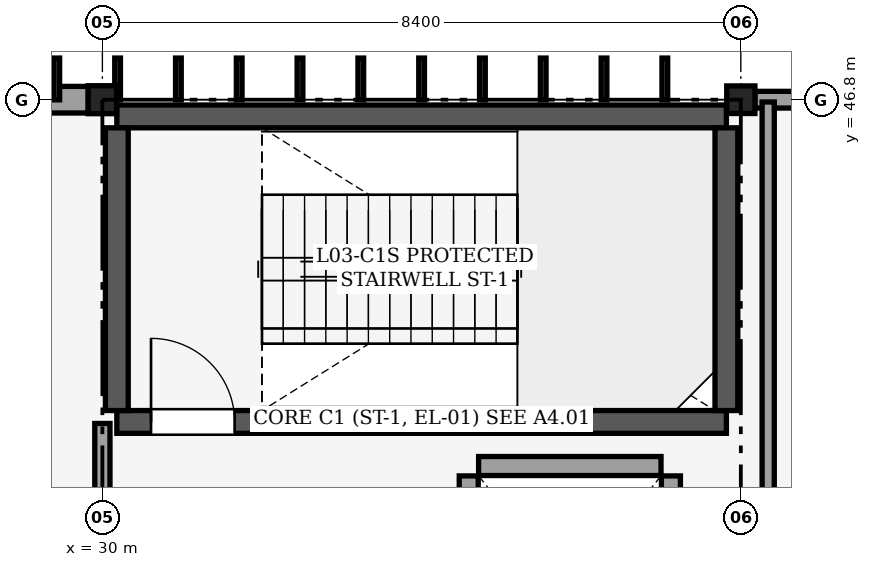
"""IFC4 building model, lengths in metres.
Left out: names, types, materials, properties, quantities, classifications, styles, units other than length and angle.
Written with IfcOpenShell. Run it as: python <this file> out.ifc"""

import sys

from ifc_helpers import new_model, si_unit, direction, frame, frame_2d, origin, origin_2d, place, context, subcontext, project, spatial, rectangle, i_section, extrude, element, fill, save


model = new_model("IFC4")
c1 = context("Model", 3, precision=1e-05, world=origin(), true_north=direction((0.0, 1.0)))
c2 = subcontext(c1, "Body", "Model", "MODEL_VIEW")
j1 = project(units=[si_unit("LENGTHUNIT", "METRE"), si_unit("PLANEANGLEUNIT", "RADIAN")], contexts=[c1])
p1 = place(None, origin())
s1 = spatial("IfcSite", under=j1, at=p1, CompositionType="ELEMENT")
p2 = place(p1, origin())
s2 = spatial("IfcBuilding", under=s1, at=p2, CompositionType="ELEMENT")
p3 = place(p2, frame((0.0, 0.0, 15.0)))
s3 = spatial("IfcBuildingStorey", under=s2, at=p3, CompositionType="ELEMENT", Elevation=15.0)
p4 = place(p3, frame((30.0, 46.8, 0.0), z_axis=(0.0, 0.0, 1.0), x_axis=(1.0, 0.0, 0.0)))
e1 = element("IfcColumn", 1, at=p4, inside=s3, PredefinedType="COLUMN", context=c2, shape_type="SweptSolid", body=[
    extrude(i_section(OverallWidth=0.373, OverallDepth=0.368, WebThickness=0.015, FlangeThickness=0.024, FilletRadius=0.025, at=origin_2d()), origin(), (0.0, 0.0, 1.0), 4.8),
])
p5 = place(p3, frame((38.4, 46.8, 0.0), z_axis=(0.0, 0.0, 1.0), x_axis=(1.0, 0.0, 0.0)))
e2 = element("IfcColumn", 2, at=p5, inside=s3, PredefinedType="COLUMN", context=c2, shape_type="SweptSolid", body=[
    extrude(i_section(OverallWidth=0.371, OverallDepth=0.363, WebThickness=0.013, FlangeThickness=0.022, FilletRadius=0.025, at=origin_2d()), origin(), (0.0, 0.0, 1.0), 4.8),
])
p6 = place(p3, frame((21.787, 46.8, 0.0), z_axis=(0.0, 0.0, 1.0), x_axis=(1.0, 0.0, 0.0)))
e3 = element("IfcWall", 3, at=p6, inside=s3, PredefinedType="SOLIDWALL", context=c2, shape_type="SweptSolid", body=[
    extrude(rectangle(XDim=8.027, YDim=0.35, at=frame_2d((4.013, 0.0))), origin(), (0.0, 0.0, 1.0), 3.908),
])
p7 = place(p6, frame((3.114, 0.0, 0.9)))
e4 = element("IfcOpeningElement", 4, at=p7, cuts=e3, PredefinedType="OPENING", context=c2, shape_type="SweptSolid", body=[
    extrude(rectangle(XDim=1.8, YDim=1.75, at=frame_2d((0.9, 0.875))), frame((0.0, 0.185, 0.0), z_axis=(0.0, -1.0, 0.0), x_axis=(1.0, 0.0, 0.0)), (0.0, 0.0, 1.0), 0.371),
])
p8 = place(p3, frame((38.585, 46.8, 0.0), z_axis=(0.0, 0.0, 1.0), x_axis=(1.0, 0.0, 0.0)))
e5 = element("IfcWall", 5, at=p8, inside=s3, PredefinedType="SOLIDWALL", context=c2, shape_type="SweptSolid", body=[
    extrude(rectangle(XDim=8.031, YDim=0.22, at=frame_2d((4.015, 0.0))), origin(), (0.0, 0.0, 1.0), 3.827),
])
p9 = place(p8, frame((2.965, 0.0, 0.9)))
e6 = element("IfcOpeningElement", 6, at=p9, cuts=e5, PredefinedType="OPENING", context=c2, shape_type="SweptSolid", body=[
    extrude(rectangle(XDim=2.1, YDim=1.75, at=frame_2d((1.05, 0.875))), frame((0.0, 0.12, 0.0), z_axis=(0.0, -1.0, 0.0), x_axis=(1.0, 0.0, 0.0)), (0.0, 0.0, 1.0), 0.24),
])
p10 = place(p3, frame((30.19, 42.56, 0.0), z_axis=(0.0, 0.0, 1.0), x_axis=(1.0, 0.0, 0.0)))
e7 = element("IfcWall", 7, at=p10, inside=s3, PredefinedType="SHEAR", context=c2, shape_type="SweptSolid", body=[
    extrude(rectangle(XDim=8.02, YDim=0.3, at=frame_2d((4.01, 0.0))), origin(), (0.0, 0.0, 1.0), 4.54),
])
p11 = place(p10, frame((0.45, 0.0, 0.0)))
e8 = element("IfcOpeningElement", 8, at=p11, cuts=e7, PredefinedType="OPENING", context=c2, shape_type="SweptSolid", body=[
    extrude(rectangle(XDim=1.1, YDim=2.15, at=frame_2d((0.55, 1.075))), frame((0.0, 0.16, 0.0), z_axis=(0.0, -1.0, 0.0), x_axis=(1.0, 0.0, 0.0)), (0.0, 0.0, 1.0), 0.321),
])
p12 = place(p3, frame((30.19, 46.58, 0.0), z_axis=(0.0, 0.0, 1.0), x_axis=(1.0, 0.0, 0.0)))
e9 = element("IfcWall", 9, at=p12, inside=s3, PredefinedType="SHEAR", context=c2, shape_type="SweptSolid", body=[
    extrude(rectangle(XDim=8.02, YDim=0.3, at=frame_2d((4.01, 0.0))), origin(), (0.0, 0.0, 1.0), 4.54),
])
for number, where, z_axis, x_axis in (
    (10, (30.19, 42.71, 0.0), (0.0, 0.0, 1.0), (0.0, 1.0, 0.0)),
    (11, (38.21, 42.71, 0.0), (0.0, 0.0, 1.0), (0.0, 1.0, 0.0)),
):
    element("IfcWall", number, at=place(p3, frame(where, z_axis=z_axis, x_axis=x_axis)), inside=s3, PredefinedType="SHEAR", context=c2, shape_type="SweptSolid", body=[
        extrude(rectangle(XDim=3.72, YDim=0.3, at=frame_2d((1.86, 0.0))), origin(), (0.0, 0.0, 1.0), 4.54),
    ])
p13 = place(p3, frame((37.48, 38.85, 0.0), z_axis=(0.0, 0.0, 1.0), x_axis=(0.0, 1.0, 0.0)))
e12 = element("IfcWall", 12, at=p13, inside=s3, PredefinedType="PARTITIONING", context=c2, shape_type="SweptSolid", body=[
    extrude(rectangle(XDim=3.0, YDim=0.25, at=frame_2d((1.5, 0.0))), origin(), (0.0, 0.0, 1.0), 4.54),
])
p14 = place(p3, frame((34.95, 41.98, 0.0), z_axis=(0.0, 0.0, 1.0), x_axis=(1.0, 0.0, 0.0)))
e13 = element("IfcWall", 13, at=p14, inside=s3, PredefinedType="PARTITIONING", context=c2, shape_type="SweptSolid", body=[
    extrude(rectangle(XDim=2.4, YDim=0.25, at=frame_2d((1.2, 0.0))), origin(), (0.0, 0.0, 1.0), 4.54),
])
p15 = place(p3, frame((34.82, 38.5, 0.0), z_axis=(0.0, 0.0, 1.0), x_axis=(0.0, 1.0, 0.0)))
e14 = element("IfcWall", 14, at=p15, inside=s3, PredefinedType="PARTITIONING", context=c2, shape_type="SweptSolid", body=[
    extrude(rectangle(XDim=3.35, YDim=0.25, at=frame_2d((1.675, 0.0))), origin(), (0.0, 0.0, 1.0), 4.54),
])
p16 = place(p15, frame((0.85, 0.0, 0.0)))
e15 = element("IfcOpeningElement", 15, at=p16, cuts=e14, PredefinedType="OPENING", context=c2, shape_type="SweptSolid", body=[
    extrude(rectangle(XDim=1.25, YDim=2.15, at=frame_2d((0.625, 1.075))), frame((0.0, 0.135, 0.0), z_axis=(0.0, -1.0, 0.0), x_axis=(1.0, 0.0, 0.0)), (0.0, 0.0, 1.0), 0.271),
])
p17 = place(p3, frame((30.0, 38.62, 0.0), z_axis=(0.0, 0.0, 1.0), x_axis=(0.0, 1.0, 0.0)))
e16 = element("IfcWall", 16, at=p17, inside=s3, PredefinedType="PARTITIONING", context=c2, shape_type="SweptSolid", body=[
    extrude(rectangle(XDim=3.92, YDim=0.2, at=frame_2d((1.96, 0.0))), origin(), (0.0, 0.0, 1.0), 3.593),
])
p18 = place(p3, frame((38.76, 38.41, 0.0), z_axis=(0.0, 0.0, 1.0), x_axis=(0.0, 1.0, 0.0)))
e17 = element("IfcWall", 17, at=p18, inside=s3, PredefinedType="PARTITIONING", context=c2, shape_type="SweptSolid", body=[
    extrude(rectangle(XDim=8.36, YDim=0.16, at=frame_2d((4.18, 0.0))), origin(), (0.0, 0.0, 1.0), 4.52),
])
p19 = place(p11, origin())
e18 = element("IfcDoor", 18, at=p19, inside=s3, OperationType="SINGLE_SWING_LEFT", PredefinedType="DOOR", context=c2, shape_type="SweptSolid", body=[
    extrude(rectangle(XDim=1.1, YDim=2.15, at=frame_2d((0.55, 1.075))), frame((0.0, 0.025, 0.0), z_axis=(0.0, -1.0, 0.0), x_axis=(1.0, 0.0, 0.0)), (0.0, 0.0, 1.0), 0.05),
])
fill(e8, e18)
save(model, sys.argv[1])
